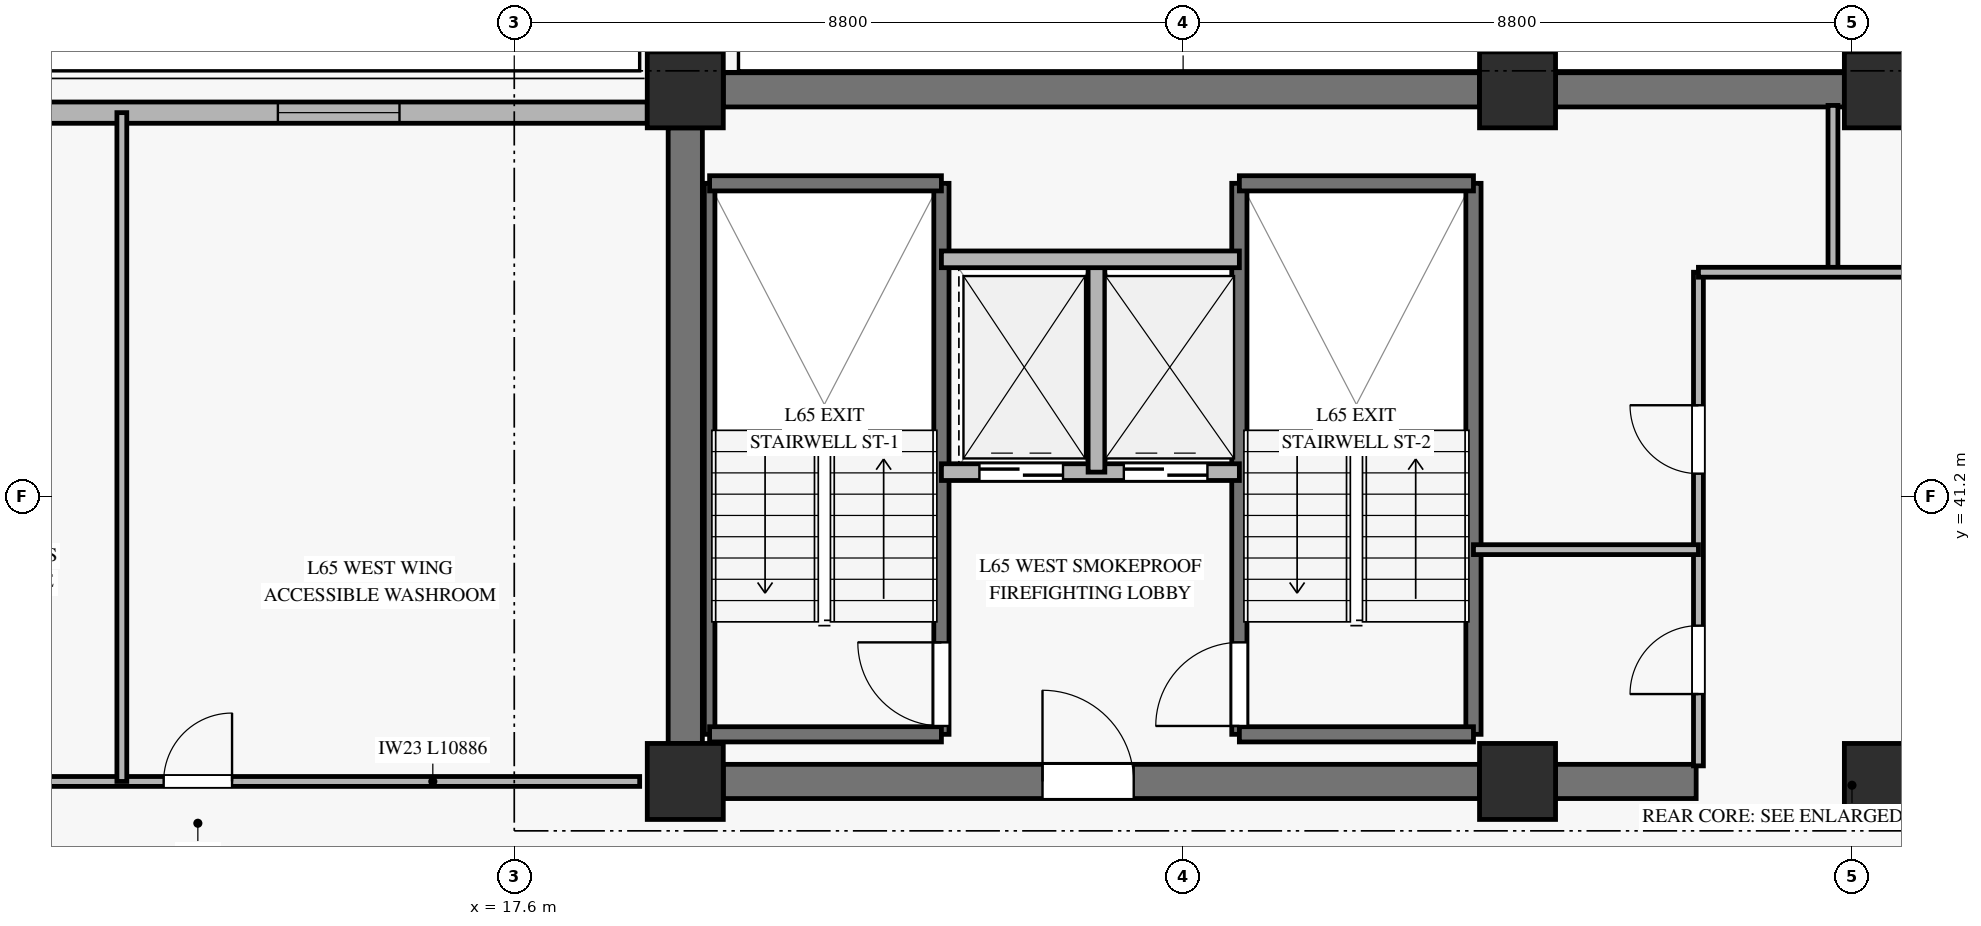
"""IFC4 building model, lengths in metres.
Left out: names, types, materials, properties, quantities, classifications, styles, units other than length and angle.
Written with IfcOpenShell. Run it as: python <this file> out.ifc"""

import sys

from ifc_helpers import new_model, si_unit, direction, frame, frame_2d, origin, origin_2d, place, context, subcontext, project, spatial, rectangle, hollow_rectangle, extrude, source, transform, mapped, element, fill, save


model = new_model("IFC4")
c1 = context("Model", 3, precision=1e-05, world=origin(), true_north=direction((0.0, 1.0)))
c2 = subcontext(c1, "Body", "Model", "MODEL_VIEW")
j1 = project(units=[si_unit("LENGTHUNIT", "METRE"), si_unit("PLANEANGLEUNIT", "RADIAN")], contexts=[c1])
p1 = place(None, origin())
s1 = spatial("IfcSite", under=j1, at=p1, CompositionType="ELEMENT")
p2 = place(p1, origin())
s2 = spatial("IfcBuilding", under=s1, at=p2, CompositionType="ELEMENT")
p3 = place(p2, frame((0.0, 0.0, 255.3)))
s3 = spatial("IfcBuildingStorey", under=s2, at=p3, CompositionType="ELEMENT", Elevation=255.3)
m1 = source(origin(), c2, "Body", "SweptSolid", [
    extrude(rectangle(XDim=1.0, YDim=1.0, at=origin_2d()), origin(), (0.0, 0.0, 1.0), 3.185),
])
for number, where, z_axis, x_axis in (
    (1, (19.85, 37.45, 0.0), (0.0, 0.0, 1.0), (1.0, 0.0, 0.0)),
    (2, (19.85, 46.55, 0.0), (0.0, 0.0, 1.0), (1.0, 0.0, 0.0)),
    (3, (30.8, 37.45, 0.0), (0.0, 0.0, 1.0), (1.0, 0.0, 0.0)),
    (4, (30.8, 46.55, 0.0), (0.0, 0.0, 1.0), (1.0, 0.0, 0.0)),
    (5, (35.6, 37.45, 0.0), (0.0, 0.0, 1.0), (1.0, 0.0, 0.0)),
    (6, (35.6, 46.55, 0.0), (0.0, 0.0, 1.0), (1.0, 0.0, 0.0)),
):
    element("IfcColumn", number, at=place(p3, frame(where, z_axis=z_axis, x_axis=x_axis)), inside=s3, PredefinedType="PILASTER", context=c2, shape_type="MappedRepresentation", body=[
        mapped(m1, transform((0.0, 0.0, 0.0), x_axis=(1.0, 0.0, 0.0), y_axis=(0.0, 1.0, 0.0), z_axis=(0.0, 0.0, 1.0), scale=1.0)),
    ])
p4 = place(p3, frame((20.35, 46.55, 0.0), z_axis=(0.0, 0.0, 1.0), x_axis=(1.0, 0.0, 0.0)))
e7 = element("IfcWall", 7, at=p4, inside=s3, PredefinedType="SHEAR", context=c2, shape_type="SweptSolid", body=[
    extrude(rectangle(XDim=9.95, YDim=0.45, at=frame_2d((4.975, 0.0))), origin(), (0.0, 0.0, 1.0), 3.185),
])
p5 = place(p3, frame((31.3, 46.55, 0.0), z_axis=(0.0, 0.0, 1.0), x_axis=(1.0, 0.0, 0.0)))
e8 = element("IfcWall", 8, at=p5, inside=s3, PredefinedType="SHEAR", context=c2, shape_type="SweptSolid", body=[
    extrude(rectangle(XDim=3.8, YDim=0.45, at=frame_2d((1.9, 0.0))), origin(), (0.0, 0.0, 1.0), 3.185),
])
p6 = place(p3, frame((20.35, 37.45, 0.0), z_axis=(0.0, 0.0, 1.0), x_axis=(1.0, 0.0, 0.0)))
e9 = element("IfcWall", 9, at=p6, inside=s3, PredefinedType="SHEAR", context=c2, shape_type="SweptSolid", body=[
    extrude(rectangle(XDim=9.95, YDim=0.45, at=frame_2d((4.975, 0.0))), origin(), (0.0, 0.0, 1.0), 3.185),
])
p7 = place(p6, frame((4.2, 0.0, 0.0)))
e10 = element("IfcOpeningElement", 10, at=p7, cuts=e9, PredefinedType="OPENING", context=c2, shape_type="SweptSolid", body=[
    extrude(rectangle(XDim=1.2, YDim=2.15, at=frame_2d((0.6, 1.075))), frame((0.0, 0.235, 0.0), z_axis=(0.0, -1.0, 0.0), x_axis=(1.0, 0.0, 0.0)), (0.0, 0.0, 1.0), 0.47),
])
p8 = place(p3, frame((31.3, 37.45, 0.0), z_axis=(0.0, 0.0, 1.0), x_axis=(1.0, 0.0, 0.0)))
e11 = element("IfcWall", 11, at=p8, inside=s3, PredefinedType="SHEAR", context=c2, shape_type="SweptSolid", body=[
    extrude(rectangle(XDim=1.85, YDim=0.45, at=frame_2d((0.925, 0.0))), origin(), (0.0, 0.0, 1.0), 3.185),
])
p9 = place(p3, frame((19.85, 37.95, 0.0), z_axis=(0.0, 0.0, 1.0), x_axis=(0.0, 1.0, 0.0)))
e12 = element("IfcWall", 12, at=p9, inside=s3, PredefinedType="SHEAR", context=c2, shape_type="SweptSolid", body=[
    extrude(rectangle(XDim=8.1, YDim=0.45, at=frame_2d((4.05, 0.0))), origin(), (0.0, 0.0, 1.0), 3.185),
])
m2 = source(origin(), c2, "Body", "SweptSolid", [
    extrude(hollow_rectangle(XDim=1.0, YDim=1.0, WallThickness=0.045, at=origin_2d()), origin(), (0.0, 0.0, 1.0), 3.207),
])
p10 = place(p3, frame((10.979, 43.485, 0.0), z_axis=(0.115040541167, 0.014008907726, 0.993262011955), x_axis=(-0.12088069872, 0.992667042203, 0.0)))
e13 = element("IfcColumn", 13, at=p10, inside=s3, PredefinedType="COLUMN", context=c2, shape_type="MappedRepresentation", body=[
    mapped(m2, transform((0.0, 0.0, 0.0), x_axis=(1.0, 0.0, 0.0), y_axis=(0.0, 1.0, 0.0), z_axis=(0.0, 0.0, 1.0), scale=1.0)),
])
m3 = source(origin(), c2, "Body", "SweptSolid", [
    extrude(hollow_rectangle(XDim=0.5, YDim=0.5, WallThickness=0.024, at=origin_2d()), origin(), (0.0, 0.0, 1.0), 3.206),
])
p11 = place(p3, frame((10.979, 46.25, 0.0), z_axis=(0.115051831153, 0.0, 0.993359489887), x_axis=(0.0, 1.0, 0.0)))
e14 = element("IfcColumn", 14, at=p11, inside=s3, PredefinedType="COLUMN", context=c2, shape_type="MappedRepresentation", body=[
    mapped(m3, transform((0.0, 0.0, 0.0), x_axis=(1.0, 0.0, 0.0), y_axis=(0.0, 1.0, 0.0), z_axis=(0.0, 0.0, 1.0), scale=1.0)),
])
p12 = place(p3, frame((11.229, 46.25, 0.0), z_axis=(0.0, 0.0, 1.0), x_axis=(1.0, 0.0, 0.0)))
e15 = element("IfcWall", 15, at=p12, inside=s3, PredefinedType="SOLIDWALL", context=c2, shape_type="SweptSolid", body=[
    extrude(rectangle(XDim=8.121, YDim=0.28, at=frame_2d((4.061, 0.0))), origin(), (0.0, 0.0, 1.0), 2.815),
])
p13 = place(p12, frame((3.261, 0.0, 0.45)))
e16 = element("IfcOpeningElement", 16, at=p13, cuts=e15, PredefinedType="OPENING", context=c2, shape_type="SweptSolid", body=[
    extrude(rectangle(XDim=1.6, YDim=2.0, at=frame_2d((0.8, 1.0))), frame((0.0, 0.15, 0.0), z_axis=(0.0, -1.0, 0.0), x_axis=(1.0, 0.0, 0.0)), (0.0, 0.0, 1.0), 0.3),
])
p14 = place(p3, frame((20.17, 38.07, 0.0), z_axis=(0.0, 0.0, 1.0), x_axis=(0.0, 1.0, 0.0)))
e17 = element("IfcWall", 17, at=p14, inside=s3, PredefinedType="SOLIDWALL", context=c2, shape_type="SweptSolid", body=[
    extrude(rectangle(XDim=7.25, YDim=0.14, at=frame_2d((3.625, 0.0))), origin(), (0.0, 0.0, 1.0), 3.4),
])
p15 = place(p3, frame((23.22, 38.07, 0.0), z_axis=(0.0, 0.0, 1.0), x_axis=(0.0, 1.0, 0.0)))
e18 = element("IfcWall", 18, at=p15, inside=s3, PredefinedType="SOLIDWALL", context=c2, shape_type="SweptSolid", body=[
    extrude(rectangle(XDim=7.25, YDim=0.2, at=frame_2d((3.625, 0.0))), origin(), (0.0, 0.0, 1.0), 3.4),
])
p16 = place(p15, frame((0.11, 0.0, 0.0)))
e19 = element("IfcOpeningElement", 19, at=p16, cuts=e18, PredefinedType="OPENING", context=c2, shape_type="SweptSolid", body=[
    extrude(rectangle(XDim=1.1, YDim=2.15, at=frame_2d((0.55, 1.075))), frame((0.0, 0.11, 0.0), z_axis=(0.0, -1.0, 0.0), x_axis=(1.0, 0.0, 0.0)), (0.0, 0.0, 1.0), 0.22),
])
for number, where, z_axis, x_axis in (
    (20, (20.17, 45.32, 0.0), (0.0, 0.0, 1.0), (1.0, 0.0, 0.0)),
    (21, (20.17, 38.07, 0.0), (0.0, 0.0, 1.0), (1.0, 0.0, 0.0)),
):
    element("IfcWall", number, at=place(p3, frame(where, z_axis=z_axis, x_axis=x_axis)), inside=s3, PredefinedType="SOLIDWALL", context=c2, shape_type="SweptSolid", body=[
        extrude(rectangle(XDim=3.05, YDim=0.2, at=frame_2d((1.525, 0.0))), origin(), (0.0, 0.0, 1.0), 3.4),
    ])
p17 = place(p3, frame((27.14, 38.07, 0.0), z_axis=(0.0, 0.0, 1.0), x_axis=(0.0, 1.0, 0.0)))
e22 = element("IfcWall", 22, at=p17, inside=s3, PredefinedType="SOLIDWALL", context=c2, shape_type="SweptSolid", body=[
    extrude(rectangle(XDim=7.25, YDim=0.2, at=frame_2d((3.625, 0.0))), origin(), (0.0, 0.0, 1.0), 3.4),
])
p18 = place(p17, frame((0.11, 0.0, 0.0)))
e23 = element("IfcOpeningElement", 23, at=p18, cuts=e22, PredefinedType="OPENING", context=c2, shape_type="SweptSolid", body=[
    extrude(rectangle(XDim=1.1, YDim=2.15, at=frame_2d((0.55, 1.075))), frame((0.0, 0.11, 0.0), z_axis=(0.0, -1.0, 0.0), x_axis=(1.0, 0.0, 0.0)), (0.0, 0.0, 1.0), 0.22),
])
p19 = place(p3, frame((30.22, 38.07, 0.0), z_axis=(0.0, 0.0, 1.0), x_axis=(0.0, 1.0, 0.0)))
e24 = element("IfcWall", 24, at=p19, inside=s3, PredefinedType="SOLIDWALL", context=c2, shape_type="SweptSolid", body=[
    extrude(rectangle(XDim=7.25, YDim=0.2, at=frame_2d((3.625, 0.0))), origin(), (0.0, 0.0, 1.0), 3.4),
])
for number, where, z_axis, x_axis in (
    (25, (27.14, 45.32, 0.0), (0.0, 0.0, 1.0), (1.0, 0.0, 0.0)),
    (26, (27.14, 38.07, 0.0), (0.0, 0.0, 1.0), (1.0, 0.0, 0.0)),
):
    element("IfcWall", number, at=place(p3, frame(where, z_axis=z_axis, x_axis=x_axis)), inside=s3, PredefinedType="SOLIDWALL", context=c2, shape_type="SweptSolid", body=[
        extrude(rectangle(XDim=3.08, YDim=0.2, at=frame_2d((1.54, 0.0))), origin(), (0.0, 0.0, 1.0), 3.4),
    ])
p20 = place(p3, frame((23.22, 41.52, 0.0), z_axis=(0.0, 0.0, 1.0), x_axis=(1.0, 0.0, 0.0)))
e27 = element("IfcWall", 27, at=p20, inside=s3, PredefinedType="SOLIDWALL", context=c2, shape_type="SweptSolid", body=[
    extrude(rectangle(XDim=3.92, YDim=0.22, at=frame_2d((1.96, 0.0))), origin(), (0.0, 0.0, 1.0), 3.185),
])
p21 = place(p20, frame((0.5, 0.0, 0.0)))
e28 = element("IfcOpeningElement", 28, at=p21, cuts=e27, PredefinedType="OPENING", context=c2, shape_type="SweptSolid", body=[
    extrude(rectangle(XDim=1.1, YDim=2.2, at=frame_2d((0.55, 1.1))), frame((0.0, 0.12, 0.0), z_axis=(0.0, -1.0, 0.0), x_axis=(1.0, 0.0, 0.0)), (0.0, 0.0, 1.0), 0.24),
])
p22 = place(p20, frame((2.4, 0.0, 0.0)))
e29 = element("IfcOpeningElement", 29, at=p22, cuts=e27, PredefinedType="OPENING", context=c2, shape_type="SweptSolid", body=[
    extrude(rectangle(XDim=1.1, YDim=2.2, at=frame_2d((0.55, 1.1))), frame((0.0, 0.12, 0.0), z_axis=(0.0, -1.0, 0.0), x_axis=(1.0, 0.0, 0.0)), (0.0, 0.0, 1.0), 0.24),
])
p23 = place(p3, frame((25.26, 41.52, 0.0), z_axis=(0.0, 0.0, 1.0), x_axis=(0.0, 1.0, 0.0)))
e30 = element("IfcWall", 30, at=p23, inside=s3, PredefinedType="SOLIDWALL", context=c2, shape_type="SweptSolid", body=[
    extrude(rectangle(XDim=2.8, YDim=0.22, at=frame_2d((1.4, 0.0))), origin(), (0.0, 0.0, 1.0), 3.185),
])
p24 = place(p3, frame((23.22, 44.32, 0.0), z_axis=(0.0, 0.0, 1.0), x_axis=(1.0, 0.0, 0.0)))
e31 = element("IfcWall", 31, at=p24, inside=s3, PredefinedType="SOLIDWALL", context=c2, shape_type="SweptSolid", body=[
    extrude(rectangle(XDim=3.92, YDim=0.22, at=frame_2d((1.96, 0.0))), origin(), (0.0, 0.0, 1.0), 3.185),
])
p25 = place(p3, frame((33.18, 37.655, 0.0), z_axis=(0.0, 0.0, 1.0), x_axis=(0.0, 1.0, 0.0)))
e32 = element("IfcWall", 32, at=p25, inside=s3, PredefinedType="PARTITIONING", context=c2, shape_type="SweptSolid", body=[
    extrude(rectangle(XDim=6.495, YDim=0.13, at=frame_2d((3.248, 0.0))), origin(), (0.0, 0.0, 1.0), 2.27),
])
p26 = place(p25, frame((0.945, 0.0, 0.0)))
e33 = element("IfcOpeningElement", 33, at=p26, cuts=e32, PredefinedType="OPENING", context=c2, shape_type="SweptSolid", body=[
    extrude(rectangle(XDim=0.9, YDim=2.1, at=frame_2d((0.45, 1.05))), frame((0.0, 0.075, 0.0), z_axis=(0.0, -1.0, 0.0), x_axis=(1.0, 0.0, 0.0)), (0.0, 0.0, 1.0), 0.15),
])
p27 = place(p25, frame((3.845, 0.0, 0.0)))
e34 = element("IfcOpeningElement", 34, at=p27, cuts=e32, PredefinedType="OPENING", context=c2, shape_type="SweptSolid", body=[
    extrude(rectangle(XDim=0.9, YDim=2.1, at=frame_2d((0.45, 1.05))), frame((0.0, 0.075, 0.0), z_axis=(0.0, -1.0, 0.0), x_axis=(1.0, 0.0, 0.0)), (0.0, 0.0, 1.0), 0.15),
])
p28 = place(p3, frame((34.95, 44.15, 0.0), z_axis=(0.0, 0.0, 1.0), x_axis=(0.0, 1.0, 0.0)))
e35 = element("IfcWall", 35, at=p28, inside=s3, PredefinedType="PARTITIONING", context=c2, shape_type="SweptSolid", body=[
    extrude(rectangle(XDim=2.195, YDim=0.13, at=frame_2d((1.098, 0.0))), origin(), (0.0, 0.0, 1.0), 3.185),
])
p29 = place(p3, frame((33.18, 44.15, 0.0), z_axis=(0.0, 0.0, 1.0), x_axis=(1.0, 0.0, 0.0)))
e36 = element("IfcWall", 36, at=p29, inside=s3, PredefinedType="PARTITIONING", context=c2, shape_type="SweptSolid", body=[
    extrude(rectangle(XDim=2.94, YDim=0.13, at=frame_2d((1.47, 0.0))), origin(), (0.0, 0.0, 1.0), 2.47),
])
p30 = place(p3, frame((30.22, 40.5, 0.0), z_axis=(0.0, 0.0, 1.0), x_axis=(1.0, 0.0, 0.0)))
e37 = element("IfcWall", 37, at=p30, inside=s3, PredefinedType="PARTITIONING", context=c2, shape_type="SweptSolid", body=[
    extrude(rectangle(XDim=2.96, YDim=0.13, at=frame_2d((1.48, 0.0))), origin(), (0.0, 0.0, 1.0), 2.47),
])
p31 = place(p3, frame((8.364, 37.45, 0.0), z_axis=(0.0, 0.0, 1.0), x_axis=(1.0, 0.0, 0.0)))
e38 = element("IfcWall", 38, at=p31, inside=s3, PredefinedType="PARTITIONING", context=c2, shape_type="SweptSolid", body=[
    extrude(rectangle(XDim=10.886, YDim=0.13, at=frame_2d((5.443, 0.0))), origin(), (0.0, 0.0, 1.0), 2.82),
])
p32 = place(p31, frame((1.315, 0.0, 0.0)))
e39 = element("IfcOpeningElement", 39, at=p32, cuts=e38, PredefinedType="OPENING", context=c2, shape_type="SweptSolid", body=[
    extrude(rectangle(XDim=0.95, YDim=2.1, at=frame_2d((0.475, 1.05))), frame((0.0, 0.075, 0.0), z_axis=(0.0, -1.0, 0.0), x_axis=(1.0, 0.0, 0.0)), (0.0, 0.0, 1.0), 0.15),
])
p33 = place(p31, frame((4.623, 0.0, 0.0)))
e40 = element("IfcOpeningElement", 40, at=p33, cuts=e38, PredefinedType="OPENING", context=c2, shape_type="SweptSolid", body=[
    extrude(rectangle(XDim=0.9, YDim=2.1, at=frame_2d((0.45, 1.05))), frame((0.0, 0.075, 0.0), z_axis=(0.0, -1.0, 0.0), x_axis=(1.0, 0.0, 0.0)), (0.0, 0.0, 1.0), 0.15),
])
p34 = place(p3, frame((12.437, 37.45, 0.0), z_axis=(0.0, 0.0, 1.0), x_axis=(0.0, 1.0, 0.0)))
e41 = element("IfcWall", 41, at=p34, inside=s3, PredefinedType="PARTITIONING", context=c2, shape_type="SweptSolid", body=[
    extrude(rectangle(XDim=8.8, YDim=0.13, at=frame_2d((4.4, 0.0))), origin(), (0.0, 0.0, 1.0), 3.185),
])
m4 = source(origin(), c2, "Body", "SweptSolid", [
    extrude(rectangle(XDim=1.6, YDim=2.0, at=frame_2d((0.8, 1.0))), frame((0.0, 0.03, 0.0), z_axis=(0.0, -1.0, 0.0), x_axis=(1.0, 0.0, 0.0)), (0.0, 0.0, 1.0), 0.06),
])
p35 = place(p13, origin())
e42 = element("IfcWindow", 42, at=p35, inside=s3, PartitioningType="SINGLE_PANEL", PredefinedType="WINDOW", context=c2, shape_type="MappedRepresentation", body=[
    mapped(m4, transform((0.0, 0.0, 0.0), x_axis=(1.0, 0.0, 0.0), y_axis=(0.0, 1.0, 0.0), z_axis=(0.0, 0.0, 1.0), scale=1.0)),
])
fill(e16, e42)
m5 = source(origin(), c2, "Body", "SweptSolid", [
    extrude(rectangle(XDim=1.1, YDim=2.15, at=frame_2d((0.55, 1.075))), frame((0.0, 0.025, 0.0), z_axis=(0.0, -1.0, 0.0), x_axis=(1.0, 0.0, 0.0)), (0.0, 0.0, 1.0), 0.05),
])
p36 = place(p16, origin())
e43 = element("IfcDoor", 43, at=p36, inside=s3, OperationType="SINGLE_SWING_RIGHT", PredefinedType="DOOR", context=c2, shape_type="MappedRepresentation", body=[
    mapped(m5, transform((0.0, 0.0, 0.0), x_axis=(1.0, 0.0, 0.0), y_axis=(0.0, 1.0, 0.0), z_axis=(0.0, 0.0, 1.0), scale=1.0)),
])
fill(e19, e43)
p37 = place(p18, origin())
e44 = element("IfcDoor", 44, at=p37, inside=s3, OperationType="SINGLE_SWING_LEFT", PredefinedType="DOOR", context=c2, shape_type="MappedRepresentation", body=[
    mapped(m5, transform((0.0, 0.0, 0.0), x_axis=(1.0, 0.0, 0.0), y_axis=(0.0, 1.0, 0.0), z_axis=(0.0, 0.0, 1.0), scale=1.0)),
])
fill(e23, e44)
m6 = source(origin(), c2, "Body", "SweptSolid", [
    extrude(rectangle(XDim=1.1, YDim=2.2, at=frame_2d((0.55, 1.1))), frame((0.0, 0.025, 0.0), z_axis=(0.0, -1.0, 0.0), x_axis=(1.0, 0.0, 0.0)), (0.0, 0.0, 1.0), 0.05),
])
p38 = place(p21, origin())
e45 = element("IfcDoor", 45, at=p38, inside=s3, OperationType="SLIDING_TO_LEFT", PredefinedType="DOOR", context=c2, shape_type="MappedRepresentation", body=[
    mapped(m6, transform((0.0, 0.0, 0.0), x_axis=(1.0, 0.0, 0.0), y_axis=(0.0, 1.0, 0.0), z_axis=(0.0, 0.0, 1.0), scale=1.0)),
])
fill(e28, e45)
p39 = place(p22, origin())
e46 = element("IfcDoor", 46, at=p39, inside=s3, OperationType="SLIDING_TO_LEFT", PredefinedType="DOOR", context=c2, shape_type="MappedRepresentation", body=[
    mapped(m6, transform((0.0, 0.0, 0.0), x_axis=(1.0, 0.0, 0.0), y_axis=(0.0, 1.0, 0.0), z_axis=(0.0, 0.0, 1.0), scale=1.0)),
])
fill(e29, e46)
m7 = source(origin(), c2, "Body", "SweptSolid", [
    extrude(rectangle(XDim=1.2, YDim=2.15, at=frame_2d((0.6, 1.075))), frame((0.0, 0.025, 0.0), z_axis=(0.0, -1.0, 0.0), x_axis=(1.0, 0.0, 0.0)), (0.0, 0.0, 1.0), 0.05),
])
p40 = place(p7, origin())
e47 = element("IfcDoor", 47, at=p40, inside=s3, OperationType="SINGLE_SWING_LEFT", PredefinedType="DOOR", context=c2, shape_type="MappedRepresentation", body=[
    mapped(m7, transform((0.0, 0.0, 0.0), x_axis=(1.0, 0.0, 0.0), y_axis=(0.0, 1.0, 0.0), z_axis=(0.0, 0.0, 1.0), scale=1.0)),
])
fill(e10, e47)
m8 = source(origin(), c2, "Body", "SweptSolid", [
    extrude(rectangle(XDim=0.9, YDim=2.1, at=frame_2d((0.45, 1.05))), frame((0.0, 0.025, 0.0), z_axis=(0.0, -1.0, 0.0), x_axis=(1.0, 0.0, 0.0)), (0.0, 0.0, 1.0), 0.05),
])
p41 = place(p26, origin())
e48 = element("IfcDoor", 48, at=p41, inside=s3, OperationType="SINGLE_SWING_LEFT", PredefinedType="DOOR", context=c2, shape_type="MappedRepresentation", body=[
    mapped(m8, transform((0.0, 0.0, 0.0), x_axis=(1.0, 0.0, 0.0), y_axis=(0.0, 1.0, 0.0), z_axis=(0.0, 0.0, 1.0), scale=1.0)),
])
fill(e33, e48)
p42 = place(p27, origin())
e49 = element("IfcDoor", 49, at=p42, inside=s3, OperationType="SINGLE_SWING_RIGHT", PredefinedType="DOOR", context=c2, shape_type="MappedRepresentation", body=[
    mapped(m8, transform((0.0, 0.0, 0.0), x_axis=(1.0, 0.0, 0.0), y_axis=(0.0, 1.0, 0.0), z_axis=(0.0, 0.0, 1.0), scale=1.0)),
])
fill(e34, e49)
p43 = place(p33, origin())
e50 = element("IfcDoor", 50, at=p43, inside=s3, OperationType="SINGLE_SWING_RIGHT", PredefinedType="DOOR", context=c2, shape_type="MappedRepresentation", body=[
    mapped(m8, transform((0.0, 0.0, 0.0), x_axis=(1.0, 0.0, 0.0), y_axis=(0.0, 1.0, 0.0), z_axis=(0.0, 0.0, 1.0), scale=1.0)),
])
fill(e40, e50)
save(model, sys.argv[1])
